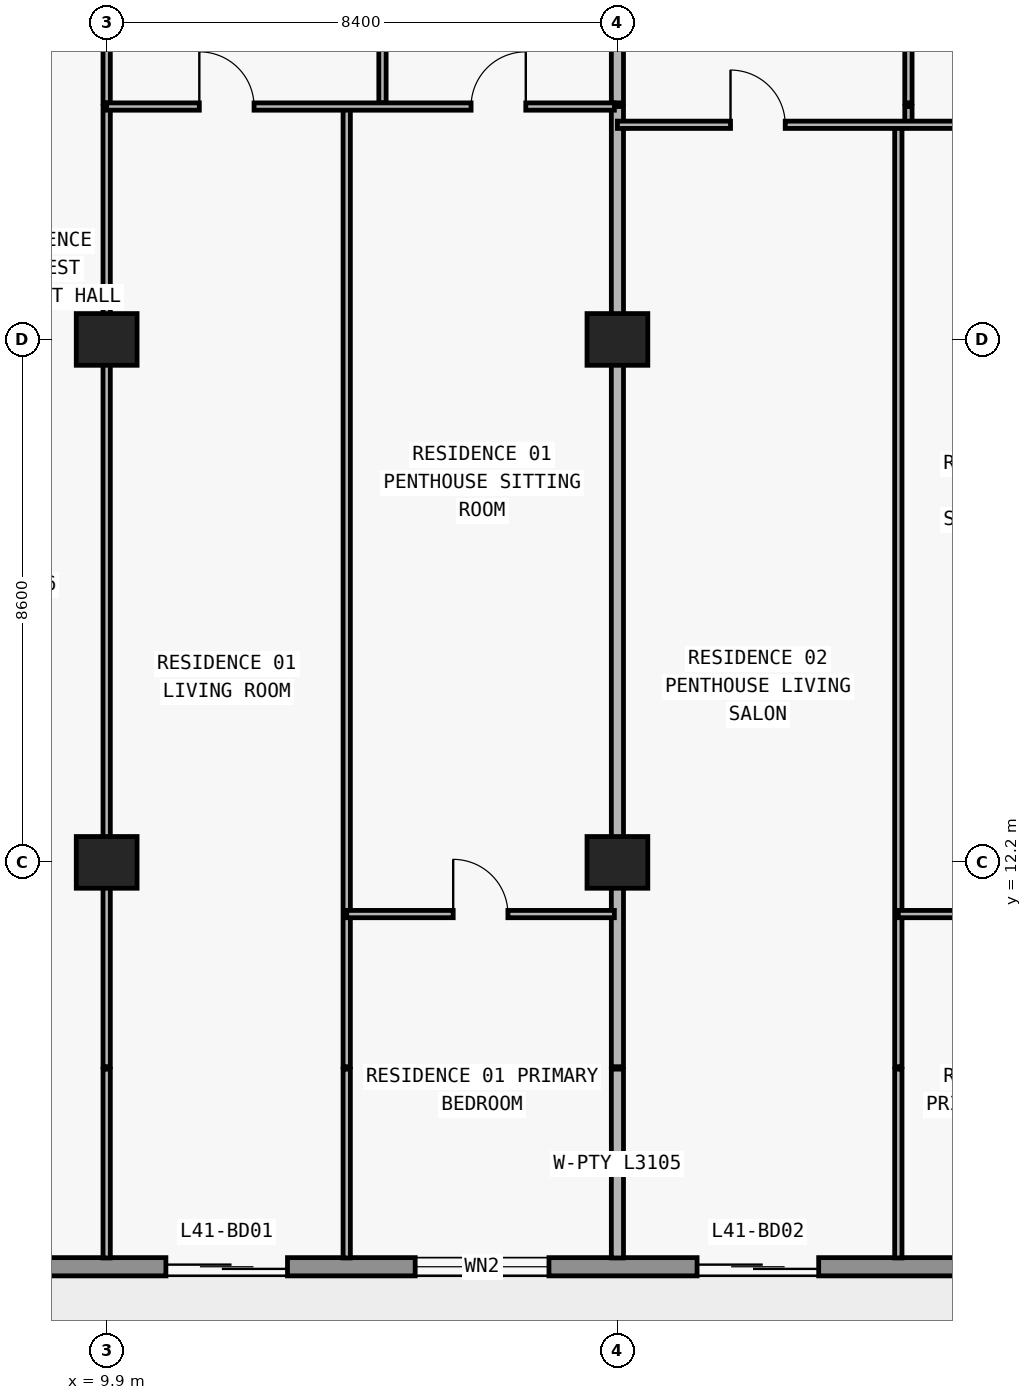
"""IFC4 building model, lengths in metres.
Left out: names, types, materials, properties, quantities, classifications, styles, units other than length and angle.
Written with IfcOpenShell. Run it as: python <this file> out.ifc"""

import sys

from ifc_helpers import new_model, si_unit, direction, frame, frame_2d, origin, origin_2d, place, context, subcontext, project, spatial, rectangle, extrude, element, fill, save


model = new_model("IFC4")
c1 = context("Model", 3, precision=1e-05, world=origin(), true_north=direction((0.0, 1.0)))
c2 = subcontext(c1, "Body", "Model", "MODEL_VIEW")
j1 = project(units=[si_unit("LENGTHUNIT", "METRE"), si_unit("PLANEANGLEUNIT", "RADIAN")], contexts=[c1])
p1 = place(None, origin())
s1 = spatial("IfcSite", under=j1, at=p1, CompositionType="ELEMENT")
p2 = place(p1, origin())
s2 = spatial("IfcBuilding", under=s1, at=p2, CompositionType="ELEMENT")
p3 = place(p2, frame((0.0, 0.0, 148.8)))
s3 = spatial("IfcBuildingStorey", under=s2, at=p3, CompositionType="ELEMENT", Elevation=148.8)
for number, where, z_axis, x_axis in (
    (1, (9.9, 12.2, 0.0), (0.0, 0.0, 1.0), (1.0, 0.0, 0.0)),
    (2, (18.3, 12.2, 0.0), (0.0, 0.0, 1.0), (1.0, 0.0, 0.0)),
    (3, (9.9, 20.8, 0.0), (0.0, 0.0, 1.0), (1.0, 0.0, 0.0)),
    (4, (18.3, 20.8, 0.0), (0.0, 0.0, 1.0), (1.0, 0.0, 0.0)),
):
    element("IfcColumn", number, at=place(p3, frame(where, z_axis=z_axis, x_axis=x_axis)), inside=s3, PredefinedType="COLUMN", context=c2, shape_type="SweptSolid", body=[
        extrude(rectangle(XDim=1.0, YDim=0.85, at=origin_2d()), origin(), (0.0, 0.0, 1.0), 3.0),
    ])
p4 = place(p3, frame((70.1, 5.55, 0.0), z_axis=(0.0, 0.0, 1.0), x_axis=(-1.0, 0.0, 0.0)))
e5 = element("IfcWall", 5, at=p4, inside=s3, PredefinedType="STANDARD", context=c2, shape_type="SweptSolid", body=[
    extrude(rectangle(XDim=62.4, YDim=0.3, at=frame_2d((31.2, 0.0))), origin(), (0.0, 0.0, 1.0), 3.0),
])
p5 = place(p4, frame((57.226, 0.0, 0.0)))
e6 = element("IfcOpeningElement", 6, at=p5, cuts=e5, PredefinedType="OPENING", context=c2, shape_type="SweptSolid", body=[
    extrude(rectangle(XDim=2.0, YDim=2.3, at=frame_2d((1.0, 1.15))), frame((0.0, 0.16, 0.0), z_axis=(0.0, -1.0, 0.0), x_axis=(1.0, 0.0, 0.0)), (0.0, 0.0, 1.0), 0.32),
])
p6 = place(p4, frame((52.926, 0.0, 0.85)))
e7 = element("IfcOpeningElement", 7, at=p6, cuts=e5, PredefinedType="OPENING", context=c2, shape_type="SweptSolid", body=[
    extrude(rectangle(XDim=2.2, YDim=1.55, at=frame_2d((1.1, 0.775))), frame((0.0, 0.16, 0.0), z_axis=(0.0, -1.0, 0.0), x_axis=(1.0, 0.0, 0.0)), (0.0, 0.0, 1.0), 0.32),
])
p7 = place(p4, frame((48.49, 0.0, 0.0)))
e8 = element("IfcOpeningElement", 8, at=p7, cuts=e5, PredefinedType="OPENING", context=c2, shape_type="SweptSolid", body=[
    extrude(rectangle(XDim=2.0, YDim=2.3, at=frame_2d((1.0, 1.15))), frame((0.0, 0.16, 0.0), z_axis=(0.0, -1.0, 0.0), x_axis=(1.0, 0.0, 0.0)), (0.0, 0.0, 1.0), 0.32),
])
p8 = place(p4, frame((44.39, 0.0, 0.85)))
e9 = element("IfcOpeningElement", 9, at=p8, cuts=e5, PredefinedType="OPENING", context=c2, shape_type="SweptSolid", body=[
    extrude(rectangle(XDim=1.8, YDim=1.55, at=frame_2d((0.9, 0.775))), frame((0.0, 0.16, 0.0), z_axis=(0.0, -1.0, 0.0), x_axis=(1.0, 0.0, 0.0)), (0.0, 0.0, 1.0), 0.32),
])
p9 = place(p4, frame((40.426, 0.0, 0.0)))
e10 = element("IfcOpeningElement", 10, at=p9, cuts=e5, PredefinedType="OPENING", context=c2, shape_type="SweptSolid", body=[
    extrude(rectangle(XDim=2.0, YDim=2.3, at=frame_2d((1.0, 1.15))), frame((0.0, 0.16, 0.0), z_axis=(0.0, -1.0, 0.0), x_axis=(1.0, 0.0, 0.0)), (0.0, 0.0, 1.0), 0.32),
])
p10 = place(p4, frame((36.126, 0.0, 0.85)))
e11 = element("IfcOpeningElement", 11, at=p10, cuts=e5, PredefinedType="OPENING", context=c2, shape_type="SweptSolid", body=[
    extrude(rectangle(XDim=2.2, YDim=1.55, at=frame_2d((1.1, 0.775))), frame((0.0, 0.16, 0.0), z_axis=(0.0, -1.0, 0.0), x_axis=(1.0, 0.0, 0.0)), (0.0, 0.0, 1.0), 0.32),
])
p11 = place(p4, frame((32.09, 0.0, 0.0)))
e12 = element("IfcOpeningElement", 12, at=p11, cuts=e5, PredefinedType="OPENING", context=c2, shape_type="SweptSolid", body=[
    extrude(rectangle(XDim=2.0, YDim=2.3, at=frame_2d((1.0, 1.15))), frame((0.0, 0.16, 0.0), z_axis=(0.0, -1.0, 0.0), x_axis=(1.0, 0.0, 0.0)), (0.0, 0.0, 1.0), 0.32),
])
p12 = place(p4, frame((28.21, 0.0, 0.65)))
e13 = element("IfcOpeningElement", 13, at=p12, cuts=e5, PredefinedType="OPENING", context=c2, shape_type="SweptSolid", body=[
    extrude(rectangle(XDim=2.6, YDim=1.85, at=frame_2d((1.3, 0.925))), frame((0.0, 0.16, 0.0), z_axis=(0.0, -1.0, 0.0), x_axis=(1.0, 0.0, 0.0)), (0.0, 0.0, 1.0), 0.32),
])
p13 = place(p4, frame((22.1, 0.0, 0.85)))
e14 = element("IfcOpeningElement", 14, at=p13, cuts=e5, PredefinedType="OPENING", context=c2, shape_type="SweptSolid", body=[
    extrude(rectangle(XDim=2.2, YDim=1.55, at=frame_2d((1.1, 0.775))), frame((0.0, 0.16, 0.0), z_axis=(0.0, -1.0, 0.0), x_axis=(1.0, 0.0, 0.0)), (0.0, 0.0, 1.0), 0.32),
])
p14 = place(p4, frame((16.09, 0.0, 0.0)))
e15 = element("IfcOpeningElement", 15, at=p14, cuts=e5, PredefinedType="OPENING", context=c2, shape_type="SweptSolid", body=[
    extrude(rectangle(XDim=2.0, YDim=2.3, at=frame_2d((1.0, 1.15))), frame((0.0, 0.16, 0.0), z_axis=(0.0, -1.0, 0.0), x_axis=(1.0, 0.0, 0.0)), (0.0, 0.0, 1.0), 0.32),
])
p15 = place(p4, frame((11.41, 0.0, 0.65)))
e16 = element("IfcOpeningElement", 16, at=p15, cuts=e5, PredefinedType="OPENING", context=c2, shape_type="SweptSolid", body=[
    extrude(rectangle(XDim=2.6, YDim=1.85, at=frame_2d((1.3, 0.925))), frame((0.0, 0.16, 0.0), z_axis=(0.0, -1.0, 0.0), x_axis=(1.0, 0.0, 0.0)), (0.0, 0.0, 1.0), 0.32),
])
p16 = place(p4, frame((5.3, 0.0, 0.85)))
e17 = element("IfcOpeningElement", 17, at=p16, cuts=e5, PredefinedType="OPENING", context=c2, shape_type="SweptSolid", body=[
    extrude(rectangle(XDim=2.2, YDim=1.55, at=frame_2d((1.1, 0.775))), frame((0.0, 0.16, 0.0), z_axis=(0.0, -1.0, 0.0), x_axis=(1.0, 0.0, 0.0)), (0.0, 0.0, 1.0), 0.32),
])
p17 = place(p3, frame((9.9, 5.695, 0.0), z_axis=(0.0, 0.0, 1.0), x_axis=(0.0, 1.0, 0.0)))
e18 = element("IfcWall", 18, at=p17, inside=s3, PredefinedType="PARTITIONING", context=c2, shape_type="SweptSolid", body=[
    extrude(rectangle(XDim=3.105, YDim=0.12, at=frame_2d((1.552, 0.0))), origin(), (0.0, 0.0, 1.0), 3.0),
])
p18 = place(p3, frame((9.9, 8.84, 0.0), z_axis=(0.0, 0.0, 1.0), x_axis=(0.0, 1.0, 0.0)))
e19 = element("IfcWall", 19, at=p18, inside=s3, PredefinedType="PARTITIONING", context=c2, shape_type="SweptSolid", body=[
    extrude(rectangle(XDim=15.79, YDim=0.12, at=frame_2d((7.895, 0.0))), origin(), (0.0, 0.0, 1.0), 2.124),
])
p19 = place(p3, frame((9.9, 24.69, 0.0), z_axis=(0.0, 0.0, 1.0), x_axis=(0.0, 1.0, 0.0)))
e20 = element("IfcWall", 20, at=p19, inside=s3, PredefinedType="PARTITIONING", context=c2, shape_type="SweptSolid", body=[
    extrude(rectangle(XDim=5.09, YDim=0.12, at=frame_2d((2.545, 0.0))), origin(), (0.0, 0.0, 1.0), 2.124),
])
p20 = place(p19, frame((2.095, 0.0, 0.0)))
e21 = element("IfcOpeningElement", 21, at=p20, cuts=e20, PredefinedType="OPENING", context=c2, shape_type="SweptSolid", body=[
    extrude(rectangle(XDim=0.9, YDim=2.074, at=frame_2d((0.45, 1.037))), frame((0.0, 0.07, 0.0), z_axis=(0.0, -1.0, 0.0), x_axis=(1.0, 0.0, 0.0)), (0.0, 0.0, 1.0), 0.14),
])
p21 = place(p3, frame((13.848, 5.695, 0.0), z_axis=(0.0, 0.0, 1.0), x_axis=(0.0, 1.0, 0.0)))
e22 = element("IfcWall", 22, at=p21, inside=s3, PredefinedType="PARTITIONING", context=c2, shape_type="SweptSolid", body=[
    extrude(rectangle(XDim=3.105, YDim=0.12, at=frame_2d((1.552, 0.0))), origin(), (0.0, 0.0, 1.0), 3.0),
])
p22 = place(p3, frame((13.848, 8.84, 0.0), z_axis=(0.0, 0.0, 1.0), x_axis=(0.0, 1.0, 0.0)))
e23 = element("IfcWall", 23, at=p22, inside=s3, PredefinedType="PARTITIONING", context=c2, shape_type="SweptSolid", body=[
    extrude(rectangle(XDim=15.79, YDim=0.12, at=frame_2d((7.895, 0.0))), origin(), (0.0, 0.0, 1.0), 3.0),
])
p23 = place(p3, frame((14.436, 24.69, 0.0), z_axis=(0.0, 0.0, 1.0), x_axis=(0.0, 1.0, 0.0)))
e24 = element("IfcWall", 24, at=p23, inside=s3, PredefinedType="PARTITIONING", context=c2, shape_type="SweptSolid", body=[
    extrude(rectangle(XDim=5.09, YDim=0.12, at=frame_2d((2.545, 0.0))), origin(), (0.0, 0.0, 1.0), 3.0),
])
p24 = place(p23, frame((2.095, 0.0, 0.0)))
e25 = element("IfcOpeningElement", 25, at=p24, cuts=e24, PredefinedType="OPENING", context=c2, shape_type="SweptSolid", body=[
    extrude(rectangle(XDim=0.9, YDim=2.15, at=frame_2d((0.45, 1.075))), frame((0.0, 0.07, 0.0), z_axis=(0.0, -1.0, 0.0), x_axis=(1.0, 0.0, 0.0)), (0.0, 0.0, 1.0), 0.14),
])
p25 = place(p3, frame((18.3, 5.695, 0.0), z_axis=(0.0, 0.0, 1.0), x_axis=(0.0, 1.0, 0.0)))
e26 = element("IfcWall", 26, at=p25, inside=s3, PredefinedType="PARTITIONING", context=c2, shape_type="SweptSolid", body=[
    extrude(rectangle(XDim=3.105, YDim=0.2, at=frame_2d((1.552, 0.0))), origin(), (0.0, 0.0, 1.0), 3.0),
])
p26 = place(p3, frame((18.3, 8.84, 0.0), z_axis=(0.0, 0.0, 1.0), x_axis=(0.0, 1.0, 0.0)))
e27 = element("IfcWall", 27, at=p26, inside=s3, PredefinedType="PARTITIONING", context=c2, shape_type="SweptSolid", body=[
    extrude(rectangle(XDim=15.79, YDim=0.2, at=frame_2d((7.895, 0.0))), origin(), (0.0, 0.0, 1.0), 2.124),
])
p27 = place(p3, frame((18.3, 24.69, 0.0), z_axis=(0.0, 0.0, 1.0), x_axis=(0.0, 1.0, 0.0)))
e28 = element("IfcWall", 28, at=p27, inside=s3, PredefinedType="PARTITIONING", context=c2, shape_type="SweptSolid", body=[
    extrude(rectangle(XDim=5.09, YDim=0.2, at=frame_2d((2.545, 0.0))), origin(), (0.0, 0.0, 1.0), 2.124),
])
p28 = place(p3, frame((22.92, 5.695, 0.0), z_axis=(0.0, 0.0, 1.0), x_axis=(0.0, 1.0, 0.0)))
e29 = element("IfcWall", 29, at=p28, inside=s3, PredefinedType="PARTITIONING", context=c2, shape_type="SweptSolid", body=[
    extrude(rectangle(XDim=3.105, YDim=0.12, at=frame_2d((1.552, 0.0))), origin(), (0.0, 0.0, 1.0), 3.0),
])
p29 = place(p3, frame((22.92, 8.84, 0.0), z_axis=(0.0, 0.0, 1.0), x_axis=(0.0, 1.0, 0.0)))
e30 = element("IfcWall", 30, at=p29, inside=s3, PredefinedType="PARTITIONING", context=c2, shape_type="SweptSolid", body=[
    extrude(rectangle(XDim=15.49, YDim=0.12, at=frame_2d((7.745, 0.0))), origin(), (0.0, 0.0, 1.0), 3.0),
])
p30 = place(p3, frame((23.086, 24.335, 0.0), z_axis=(0.0, 0.0, 1.0), x_axis=(0.0, 1.0, 0.0)))
e31 = element("IfcWall", 31, at=p30, inside=s3, PredefinedType="PARTITIONING", context=c2, shape_type="SweptSolid", body=[
    extrude(rectangle(XDim=0.295, YDim=0.12, at=frame_2d((0.147, 0.0))), origin(), (0.0, 0.0, 1.0), 3.0),
])
p31 = place(p3, frame((23.086, 24.69, 0.0), z_axis=(0.0, 0.0, 1.0), x_axis=(0.0, 1.0, 0.0)))
e32 = element("IfcWall", 32, at=p31, inside=s3, PredefinedType="PARTITIONING", context=c2, shape_type="SweptSolid", body=[
    extrude(rectangle(XDim=4.79, YDim=0.12, at=frame_2d((2.395, 0.0))), origin(), (0.0, 0.0, 1.0), 3.0),
])
p32 = place(p31, frame((1.945, 0.0, 0.0)))
e33 = element("IfcOpeningElement", 33, at=p32, cuts=e32, PredefinedType="OPENING", context=c2, shape_type="SweptSolid", body=[
    extrude(rectangle(XDim=0.9, YDim=2.15, at=frame_2d((0.45, 1.075))), frame((0.0, 0.07, 0.0), z_axis=(0.0, -1.0, 0.0), x_axis=(1.0, 0.0, 0.0)), (0.0, 0.0, 1.0), 0.14),
])
p33 = place(p3, frame((13.848, 11.35, 0.0), z_axis=(0.0, 0.0, 1.0), x_axis=(1.0, 0.0, 0.0)))
e34 = element("IfcWall", 34, at=p33, inside=s3, PredefinedType="PARTITIONING", context=c2, shape_type="SweptSolid", body=[
    extrude(rectangle(XDim=4.402, YDim=0.12, at=frame_2d((2.201, 0.0))), origin(), (0.0, 0.0, 1.0), 3.0),
])
p34 = place(p33, frame((1.751, 0.0, 0.0)))
e35 = element("IfcOpeningElement", 35, at=p34, cuts=e34, PredefinedType="OPENING", context=c2, shape_type="SweptSolid", body=[
    extrude(rectangle(XDim=0.9, YDim=2.15, at=frame_2d((0.45, 1.075))), frame((0.0, 0.07, 0.0), z_axis=(0.0, -1.0, 0.0), x_axis=(1.0, 0.0, 0.0)), (0.0, 0.0, 1.0), 0.14),
])
p35 = place(p3, frame((22.92, 11.35, 0.0), z_axis=(0.0, 0.0, 1.0), x_axis=(1.0, 0.0, 0.0)))
e36 = element("IfcWall", 36, at=p35, inside=s3, PredefinedType="PARTITIONING", context=c2, shape_type="SweptSolid", body=[
    extrude(rectangle(XDim=3.73, YDim=0.12, at=frame_2d((1.865, 0.0))), origin(), (0.0, 0.0, 1.0), 3.0),
])
p36 = place(p35, frame((1.415, 0.0, 0.0)))
e37 = element("IfcOpeningElement", 37, at=p36, cuts=e36, PredefinedType="OPENING", context=c2, shape_type="SweptSolid", body=[
    extrude(rectangle(XDim=0.9, YDim=2.15, at=frame_2d((0.45, 1.075))), frame((0.0, 0.07, 0.0), z_axis=(0.0, -1.0, 0.0), x_axis=(1.0, 0.0, 0.0)), (0.0, 0.0, 1.0), 0.14),
])
p37 = place(p3, frame((18.3, 24.33, 0.0), z_axis=(0.0, 0.0, 1.0), x_axis=(1.0, 0.0, 0.0)))
e38 = element("IfcWall", 38, at=p37, inside=s3, PredefinedType="PARTITIONING", context=c2, shape_type="SweptSolid", body=[
    extrude(rectangle(XDim=8.18, YDim=0.12, at=frame_2d((4.09, 0.0))), origin(), (0.0, 0.0, 1.0), 3.0),
])
p38 = place(p37, frame((1.86, 0.0, 0.0)))
e39 = element("IfcOpeningElement", 39, at=p38, cuts=e38, PredefinedType="OPENING", context=c2, shape_type="SweptSolid", body=[
    extrude(rectangle(XDim=0.9, YDim=2.15, at=frame_2d((0.45, 1.075))), frame((0.0, 0.07, 0.0), z_axis=(0.0, -1.0, 0.0), x_axis=(1.0, 0.0, 0.0)), (0.0, 0.0, 1.0), 0.14),
])
p39 = place(p37, frame((6.033, 0.0, 0.0)))
e40 = element("IfcOpeningElement", 40, at=p39, cuts=e38, PredefinedType="OPENING", context=c2, shape_type="SweptSolid", body=[
    extrude(rectangle(XDim=0.9, YDim=2.15, at=frame_2d((0.45, 1.075))), frame((0.0, 0.07, 0.0), z_axis=(0.0, -1.0, 0.0), x_axis=(1.0, 0.0, 0.0)), (0.0, 0.0, 1.0), 0.14),
])
p40 = place(p3, frame((9.9, 24.63, 0.0), z_axis=(0.0, 0.0, 1.0), x_axis=(1.0, 0.0, 0.0)))
e41 = element("IfcWall", 41, at=p40, inside=s3, PredefinedType="PARTITIONING", context=c2, shape_type="SweptSolid", body=[
    extrude(rectangle(XDim=8.35, YDim=0.12, at=frame_2d((4.175, 0.0))), origin(), (0.0, 0.0, 1.0), 3.0),
])
p41 = place(p40, frame((1.524, 0.0, 0.0)))
e42 = element("IfcOpeningElement", 42, at=p41, cuts=e41, PredefinedType="OPENING", context=c2, shape_type="SweptSolid", body=[
    extrude(rectangle(XDim=0.9, YDim=2.15, at=frame_2d((0.45, 1.075))), frame((0.0, 0.07, 0.0), z_axis=(0.0, -1.0, 0.0), x_axis=(1.0, 0.0, 0.0)), (0.0, 0.0, 1.0), 0.14),
])
p42 = place(p40, frame((5.993, 0.0, 0.0)))
e43 = element("IfcOpeningElement", 43, at=p42, cuts=e41, PredefinedType="OPENING", context=c2, shape_type="SweptSolid", body=[
    extrude(rectangle(XDim=0.9, YDim=2.15, at=frame_2d((0.45, 1.075))), frame((0.0, 0.07, 0.0), z_axis=(0.0, -1.0, 0.0), x_axis=(1.0, 0.0, 0.0)), (0.0, 0.0, 1.0), 0.14),
])
p43 = place(p5, origin())
e44 = element("IfcDoor", 44, at=p43, inside=s3, OperationType="DOUBLE_DOOR_SLIDING", PredefinedType="DOOR", context=c2, shape_type="SweptSolid", body=[
    extrude(rectangle(XDim=2.0, YDim=2.3, at=frame_2d((1.0, 1.15))), frame((0.0, 0.025, 0.0), z_axis=(0.0, -1.0, 0.0), x_axis=(1.0, 0.0, 0.0)), (0.0, 0.0, 1.0), 0.05),
])
fill(e6, e44)
p44 = place(p6, origin())
e45 = element("IfcWindow", 45, at=p44, inside=s3, PartitioningType="SINGLE_PANEL", PredefinedType="WINDOW", context=c2, shape_type="SweptSolid", body=[
    extrude(rectangle(XDim=2.2, YDim=1.55, at=frame_2d((1.1, 0.775))), frame((0.0, 0.03, 0.0), z_axis=(0.0, -1.0, 0.0), x_axis=(1.0, 0.0, 0.0)), (0.0, 0.0, 1.0), 0.06),
])
fill(e7, e45)
p45 = place(p7, origin())
e46 = element("IfcDoor", 46, at=p45, inside=s3, OperationType="DOUBLE_DOOR_SLIDING", PredefinedType="DOOR", context=c2, shape_type="SweptSolid", body=[
    extrude(rectangle(XDim=2.0, YDim=2.3, at=frame_2d((1.0, 1.15))), frame((0.0, 0.025, 0.0), z_axis=(0.0, -1.0, 0.0), x_axis=(1.0, 0.0, 0.0)), (0.0, 0.0, 1.0), 0.05),
])
fill(e8, e46)
p46 = place(p41, origin())
e47 = element("IfcDoor", 47, at=p46, inside=s3, OperationType="SINGLE_SWING_LEFT", PredefinedType="DOOR", context=c2, shape_type="SweptSolid", body=[
    extrude(rectangle(XDim=0.9, YDim=2.15, at=frame_2d((0.45, 1.075))), frame((0.0, 0.025, 0.0), z_axis=(0.0, -1.0, 0.0), x_axis=(1.0, 0.0, 0.0)), (0.0, 0.0, 1.0), 0.05),
])
fill(e42, e47)
p47 = place(p42, origin())
e48 = element("IfcDoor", 48, at=p47, inside=s3, OperationType="SINGLE_SWING_RIGHT", PredefinedType="DOOR", context=c2, shape_type="SweptSolid", body=[
    extrude(rectangle(XDim=0.9, YDim=2.15, at=frame_2d((0.45, 1.075))), frame((0.0, 0.025, 0.0), z_axis=(0.0, -1.0, 0.0), x_axis=(1.0, 0.0, 0.0)), (0.0, 0.0, 1.0), 0.05),
])
fill(e43, e48)
p48 = place(p34, origin())
e49 = element("IfcDoor", 49, at=p48, inside=s3, OperationType="SINGLE_SWING_LEFT", PredefinedType="DOOR", context=c2, shape_type="SweptSolid", body=[
    extrude(rectangle(XDim=0.9, YDim=2.15, at=frame_2d((0.45, 1.075))), frame((0.0, 0.025, 0.0), z_axis=(0.0, -1.0, 0.0), x_axis=(1.0, 0.0, 0.0)), (0.0, 0.0, 1.0), 0.05),
])
fill(e35, e49)
p49 = place(p38, origin())
e50 = element("IfcDoor", 50, at=p49, inside=s3, OperationType="SINGLE_SWING_LEFT", PredefinedType="DOOR", context=c2, shape_type="SweptSolid", body=[
    extrude(rectangle(XDim=0.9, YDim=2.15, at=frame_2d((0.45, 1.075))), frame((0.0, 0.025, 0.0), z_axis=(0.0, -1.0, 0.0), x_axis=(1.0, 0.0, 0.0)), (0.0, 0.0, 1.0), 0.05),
])
fill(e39, e50)
save(model, sys.argv[1])
